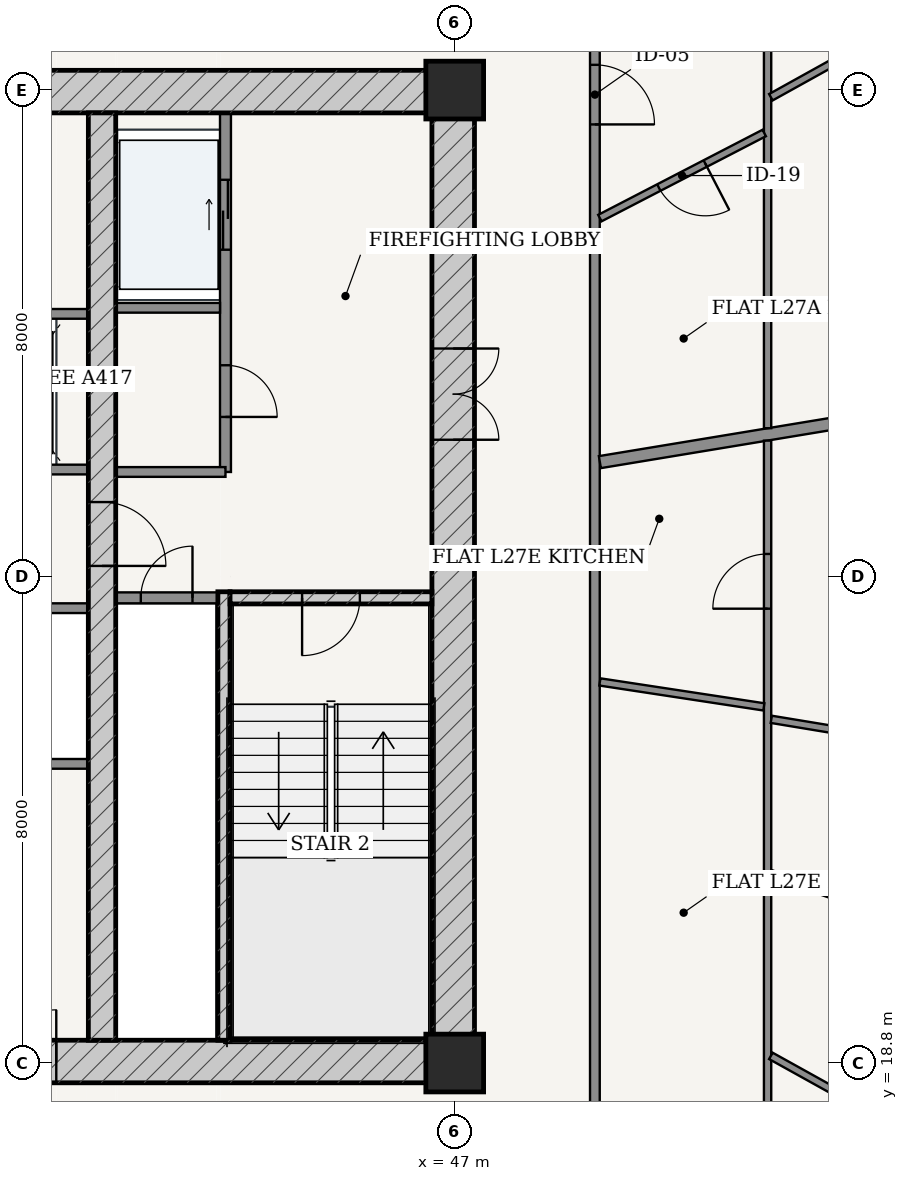
"""IFC4 building model, lengths in metres.
Left out: names, types, materials, properties, quantities, classifications, styles, units other than length and angle.
Written with IfcOpenShell. Run it as: python <this file> out.ifc"""

import sys

from ifc_helpers import new_model, si_unit, direction, frame, frame_2d, origin, origin_2d, place, context, subcontext, project, spatial, rectangle, extrude, source, transform, mapped, element, fill, save


model = new_model("IFC4")
c1 = context("Model", 3, precision=1e-05, world=origin(), true_north=direction((-0.2419218956, 0.970295726276)))
c2 = subcontext(c1, "Body", "Model", "MODEL_VIEW")
j1 = project(units=[si_unit("LENGTHUNIT", "METRE"), si_unit("PLANEANGLEUNIT", "RADIAN")], contexts=[c1])
p1 = place(None, origin())
s1 = spatial("IfcSite", under=j1, at=p1, CompositionType="ELEMENT")
p2 = place(p1, origin())
s2 = spatial("IfcBuilding", under=s1, at=p2, CompositionType="ELEMENT")
p3 = place(p2, frame((0.0, 0.0, 105.0)))
s3 = spatial("IfcBuildingStorey", under=s2, at=p3, CompositionType="ELEMENT", Elevation=105.0)
for number, where, z_axis, x_axis in (
    (1, (47.0, 18.8, 0.0), (0.0, 0.0, 1.0), (1.0, 0.0, 0.0)),
    (2, (47.0, 34.8, 0.0), (0.0, 0.0, 1.0), (1.0, 0.0, 0.0)),
):
    element("IfcColumn", number, at=place(p3, frame(where, z_axis=z_axis, x_axis=x_axis)), inside=s3, PredefinedType="COLUMN", context=c2, shape_type="SweptSolid", body=[
        extrude(rectangle(XDim=0.95, YDim=0.95, at=origin_2d()), origin(), (0.0, 0.0, 1.0), 3.6),
    ])
p4 = place(p3, frame((28.675, 18.825, 0.0), z_axis=(0.0, 0.0, 1.0), x_axis=(1.0, 0.0, 0.0)))
e3 = element("IfcWall", 3, at=p4, inside=s3, PredefinedType="SHEAR", context=c2, shape_type="SweptSolid", body=[
    extrude(rectangle(XDim=18.65, YDim=0.7, at=frame_2d((9.325, 0.0))), origin(), (0.0, 0.0, 1.0), 3.325),
])
p5 = place(p4, frame((6.877, 0.0, 0.0)))
e4 = element("IfcOpeningElement", 4, at=p5, cuts=e3, PredefinedType="OPENING", context=c2, shape_type="SweptSolid", body=[
    extrude(rectangle(XDim=0.85, YDim=2.1, at=frame_2d((0.425, 1.05))), frame((0.0, 0.36, 0.0), z_axis=(0.0, -1.0, 0.0), x_axis=(1.0, 0.0, 0.0)), (0.0, 0.0, 1.0), 0.72),
])
p6 = place(p4, frame((8.9, 0.0, 0.0)))
e5 = element("IfcOpeningElement", 5, at=p6, cuts=e3, PredefinedType="OPENING", context=c2, shape_type="SweptSolid", body=[
    extrude(rectangle(XDim=0.85, YDim=2.1, at=frame_2d((0.425, 1.05))), frame((0.0, 0.36, 0.0), z_axis=(0.0, -1.0, 0.0), x_axis=(1.0, 0.0, 0.0)), (0.0, 0.0, 1.0), 0.72),
])
p7 = place(p4, frame((10.923, 0.0, 0.0)))
e6 = element("IfcOpeningElement", 6, at=p7, cuts=e3, PredefinedType="OPENING", context=c2, shape_type="SweptSolid", body=[
    extrude(rectangle(XDim=0.85, YDim=2.1, at=frame_2d((0.425, 1.05))), frame((0.0, 0.36, 0.0), z_axis=(0.0, -1.0, 0.0), x_axis=(1.0, 0.0, 0.0)), (0.0, 0.0, 1.0), 0.72),
])
p8 = place(p3, frame((28.675, 34.775, 0.0), z_axis=(0.0, 0.0, 1.0), x_axis=(1.0, 0.0, 0.0)))
e7 = element("IfcWall", 7, at=p8, inside=s3, PredefinedType="SHEAR", context=c2, shape_type="SweptSolid", body=[
    extrude(rectangle(XDim=18.65, YDim=0.7, at=frame_2d((9.325, 0.0))), origin(), (0.0, 0.0, 1.0), 3.325),
])
p9 = place(p8, frame((7.357, 0.0, 0.0)))
e8 = element("IfcOpeningElement", 8, at=p9, cuts=e7, PredefinedType="OPENING", context=c2, shape_type="SweptSolid", body=[
    extrude(rectangle(XDim=0.86, YDim=2.1, at=frame_2d((0.43, 1.05))), frame((0.0, 0.36, 0.0), z_axis=(0.0, -1.0, 0.0), x_axis=(1.0, 0.0, 0.0)), (0.0, 0.0, 1.0), 0.72),
])
p10 = place(p8, frame((10.438, 0.0, 0.0)))
e9 = element("IfcOpeningElement", 9, at=p10, cuts=e7, PredefinedType="OPENING", context=c2, shape_type="SweptSolid", body=[
    extrude(rectangle(XDim=0.85, YDim=2.1, at=frame_2d((0.425, 1.05))), frame((0.0, 0.36, 0.0), z_axis=(0.0, -1.0, 0.0), x_axis=(1.0, 0.0, 0.0)), (0.0, 0.0, 1.0), 0.72),
])
p11 = place(p3, frame((46.975, 19.175, 0.0), z_axis=(0.0, 0.0, 1.0), x_axis=(0.0, 1.0, 0.0)))
e10 = element("IfcWall", 10, at=p11, inside=s3, PredefinedType="SHEAR", context=c2, shape_type="SweptSolid", body=[
    extrude(rectangle(XDim=15.25, YDim=0.7, at=frame_2d((7.625, 0.0))), origin(), (0.0, 0.0, 1.0), 3.325),
])
p12 = place(p11, frame((9.875, 0.0, 0.0)))
e11 = element("IfcOpeningElement", 11, at=p12, cuts=e10, PredefinedType="OPENING", context=c2, shape_type="SweptSolid", body=[
    extrude(rectangle(XDim=1.5, YDim=2.2, at=frame_2d((0.75, 1.1))), frame((0.0, 0.36, 0.0), z_axis=(0.0, -1.0, 0.0), x_axis=(1.0, 0.0, 0.0)), (0.0, 0.0, 1.0), 0.72),
])
p13 = place(p3, frame((43.205, 19.175, 0.0), z_axis=(0.0, 0.0, 1.0), x_axis=(0.0, 1.0, 0.0)))
e12 = element("IfcWall", 12, at=p13, inside=s3, PredefinedType="SOLIDWALL", context=c2, shape_type="SweptSolid", body=[
    extrude(rectangle(XDim=7.375, YDim=0.2, at=frame_2d((3.688, 0.0))), origin(), (0.0, 0.0, 1.0), 3.325),
])
p14 = place(p3, frame((43.305, 26.45, 0.0), z_axis=(0.0, 0.0, 1.0), x_axis=(1.0, 0.0, 0.0)))
e13 = element("IfcWall", 13, at=p14, inside=s3, PredefinedType="SOLIDWALL", context=c2, shape_type="SweptSolid", body=[
    extrude(rectangle(XDim=3.32, YDim=0.2, at=frame_2d((1.66, 0.0))), origin(), (0.0, 0.0, 1.0), 3.325),
])
p15 = place(p14, frame((1.185, 0.0, 0.0)))
e14 = element("IfcOpeningElement", 14, at=p15, cuts=e13, PredefinedType="OPENING", context=c2, shape_type="SweptSolid", body=[
    extrude(rectangle(XDim=0.95, YDim=2.15, at=frame_2d((0.475, 1.075))), frame((0.0, 0.11, 0.0), z_axis=(0.0, -1.0, 0.0), x_axis=(1.0, 0.0, 0.0)), (0.0, 0.0, 1.0), 0.22),
])
p16 = place(p3, frame((41.2, 19.175, 0.0), z_axis=(0.0, 0.0, 1.0), x_axis=(0.0, 1.0, 0.0)))
e15 = element("IfcWall", 15, at=p16, inside=s3, PredefinedType="SHEAR", context=c2, shape_type="SweptSolid", body=[
    extrude(rectangle(XDim=15.25, YDim=0.45, at=frame_2d((7.625, 0.0))), origin(), (0.0, 0.0, 1.0), 3.325),
])
p17 = place(p16, frame((7.8, 0.0, 0.0)))
e16 = element("IfcOpeningElement", 16, at=p17, cuts=e15, PredefinedType="OPENING", context=c2, shape_type="SweptSolid", body=[
    extrude(rectangle(XDim=1.05, YDim=2.15, at=frame_2d((0.525, 1.075))), frame((0.0, 0.235, 0.0), z_axis=(0.0, -1.0, 0.0), x_axis=(1.0, 0.0, 0.0)), (0.0, 0.0, 1.0), 0.47),
])
p18 = place(p3, frame((41.425, 26.45, 0.0), z_axis=(0.0, 0.0, 1.0), x_axis=(1.0, 0.0, 0.0)))
e17 = element("IfcWall", 17, at=p18, inside=s3, PredefinedType="PARTITIONING", context=c2, shape_type="SweptSolid", body=[
    extrude(rectangle(XDim=1.675, YDim=0.18, at=frame_2d((0.837, 0.0))), origin(), (0.0, 0.0, 1.0), 3.325),
])
p19 = place(p18, frame((0.413, 0.0, 0.0)))
e18 = element("IfcOpeningElement", 18, at=p19, cuts=e17, PredefinedType="OPENING", context=c2, shape_type="SweptSolid", body=[
    extrude(rectangle(XDim=0.85, YDim=2.1, at=frame_2d((0.425, 1.05))), frame((0.0, 0.1, 0.0), z_axis=(0.0, -1.0, 0.0), x_axis=(1.0, 0.0, 0.0)), (0.0, 0.0, 1.0), 0.2),
])
p20 = place(p3, frame((43.23, 28.52, 0.0), z_axis=(0.0, 0.0, 1.0), x_axis=(0.0, 1.0, 0.0)))
e19 = element("IfcWall", 19, at=p20, inside=s3, PredefinedType="PARTITIONING", context=c2, shape_type="SweptSolid", body=[
    extrude(rectangle(XDim=5.905, YDim=0.18, at=frame_2d((2.953, 0.0))), origin(), (0.0, 0.0, 1.0), 3.325),
])
p21 = place(p20, frame((0.905, 0.0, 0.0)))
e20 = element("IfcOpeningElement", 20, at=p21, cuts=e19, PredefinedType="OPENING", context=c2, shape_type="SweptSolid", body=[
    extrude(rectangle(XDim=0.85, YDim=2.1, at=frame_2d((0.425, 1.05))), frame((0.0, 0.1, 0.0), z_axis=(0.0, -1.0, 0.0), x_axis=(1.0, 0.0, 0.0)), (0.0, 0.0, 1.0), 0.2),
])
p22 = place(p20, frame((3.655, 0.0, 0.0)))
e21 = element("IfcOpeningElement", 21, at=p22, cuts=e19, PredefinedType="OPENING", context=c2, shape_type="SweptSolid", body=[
    extrude(rectangle(XDim=1.15, YDim=2.2, at=frame_2d((0.575, 1.1))), frame((0.0, 0.1, 0.0), z_axis=(0.0, -1.0, 0.0), x_axis=(1.0, 0.0, 0.0)), (0.0, 0.0, 1.0), 0.2),
])
p23 = place(p3, frame((41.425, 31.22, 0.0), z_axis=(0.0, 0.0, 1.0), x_axis=(1.0, 0.0, 0.0)))
e22 = element("IfcWall", 22, at=p23, inside=s3, PredefinedType="PARTITIONING", context=c2, shape_type="SweptSolid", body=[
    extrude(rectangle(XDim=1.715, YDim=0.16, at=frame_2d((0.857, 0.0))), origin(), (0.0, 0.0, 1.0), 3.325),
])
p24 = place(p3, frame((41.425, 28.52, 0.0), z_axis=(0.0, 0.0, 1.0), x_axis=(1.0, 0.0, 0.0)))
e23 = element("IfcWall", 23, at=p24, inside=s3, PredefinedType="PARTITIONING", context=c2, shape_type="SweptSolid", body=[
    extrude(rectangle(XDim=1.805, YDim=0.16, at=frame_2d((0.902, 0.0))), origin(), (0.0, 0.0, 1.0), 3.325),
])
p25 = place(p3, frame((35.025, 28.56, 0.0), z_axis=(0.0, 0.0, 1.0), x_axis=(1.0, 0.0, 0.0)))
e24 = element("IfcWall", 24, at=p25, inside=s3, PredefinedType="PARTITIONING", context=c2, shape_type="SweptSolid", body=[
    extrude(rectangle(XDim=5.95, YDim=0.16, at=frame_2d((2.975, 0.0))), origin(), (0.0, 0.0, 1.0), 3.325),
])
p26 = place(p25, frame((0.76, 0.0, 0.0)))
e25 = element("IfcOpeningElement", 25, at=p26, cuts=e24, PredefinedType="OPENING", context=c2, shape_type="SweptSolid", body=[
    extrude(rectangle(XDim=1.1, YDim=2.2, at=frame_2d((0.55, 1.1))), frame((0.0, 0.09, 0.0), z_axis=(0.0, -1.0, 0.0), x_axis=(1.0, 0.0, 0.0)), (0.0, 0.0, 1.0), 0.18),
])
p27 = place(p25, frame((2.425, 0.0, 0.0)))
e26 = element("IfcOpeningElement", 26, at=p27, cuts=e24, PredefinedType="OPENING", context=c2, shape_type="SweptSolid", body=[
    extrude(rectangle(XDim=1.1, YDim=2.2, at=frame_2d((0.55, 1.1))), frame((0.0, 0.09, 0.0), z_axis=(0.0, -1.0, 0.0), x_axis=(1.0, 0.0, 0.0)), (0.0, 0.0, 1.0), 0.18),
])
p28 = place(p25, frame((4.09, 0.0, 0.0)))
e27 = element("IfcOpeningElement", 27, at=p28, cuts=e24, PredefinedType="OPENING", context=c2, shape_type="SweptSolid", body=[
    extrude(rectangle(XDim=1.1, YDim=2.2, at=frame_2d((0.55, 1.1))), frame((0.0, 0.09, 0.0), z_axis=(0.0, -1.0, 0.0), x_axis=(1.0, 0.0, 0.0)), (0.0, 0.0, 1.0), 0.18),
])
for number, where, z_axis, x_axis in (
    (28, (35.025, 31.12, 0.0), (0.0, 0.0, 1.0), (1.0, 0.0, 0.0)),
    (29, (35.025, 26.28, 0.0), (0.0, 0.0, 1.0), (1.0, 0.0, 0.0)),
    (30, (35.025, 23.72, 0.0), (0.0, 0.0, 1.0), (1.0, 0.0, 0.0)),
):
    element("IfcWall", number, at=place(p3, frame(where, z_axis=z_axis, x_axis=x_axis)), inside=s3, PredefinedType="PARTITIONING", context=c2, shape_type="SweptSolid", body=[
        extrude(rectangle(XDim=5.95, YDim=0.16, at=frame_2d((2.975, 0.0))), origin(), (0.0, 0.0, 1.0), 3.325),
    ])
p29 = place(p3, frame((49.305, 16.575, 0.0), z_axis=(0.0, 0.0, 1.0), x_axis=(0.0, 1.0, 0.0)))
e31 = element("IfcWall", 31, at=p29, inside=s3, PredefinedType="PARTITIONING", context=c2, shape_type="SweptSolid", body=[
    extrude(rectangle(XDim=20.45, YDim=0.16, at=frame_2d((10.225, 0.0))), origin(), (0.0, 0.0, 1.0), 2.767),
])
p30 = place(p29, frame((17.66, 0.0, 0.0)))
e32 = element("IfcOpeningElement", 32, at=p30, cuts=e31, PredefinedType="OPENING", context=c2, shape_type="SweptSolid", body=[
    extrude(rectangle(XDim=0.98, YDim=2.2, at=frame_2d((0.49, 1.1))), frame((0.0, 0.09, 0.0), z_axis=(0.0, -1.0, 0.0), x_axis=(1.0, 0.0, 0.0)), (0.0, 0.0, 1.0), 0.18),
])
p31 = place(p3, frame((49.387, 28.682, 0.0), z_axis=(0.0, 0.0, 1.0), x_axis=(0.986617934215, 0.163049231479, 0.0)))
e33 = element("IfcWall", 33, at=p31, inside=s3, PredefinedType="PARTITIONING", context=c2, shape_type="SweptSolid", body=[
    extrude(rectangle(XDim=14.785, YDim=0.2, at=frame_2d((7.392, 0.0))), origin(), (0.0, 0.0, 1.0), 2.767),
])
p32 = place(p3, frame((52.145, 39.945, 0.0), z_axis=(0.0, 0.0, 1.0), x_axis=(0.0, -1.0, 0.0)))
e34 = element("IfcWall", 34, at=p32, inside=s3, PredefinedType="PARTITIONING", context=c2, shape_type="SweptSolid", body=[
    extrude(rectangle(XDim=10.705, YDim=0.12, at=frame_2d((5.353, 0.0))), origin(), (0.0, 0.0, 1.0), 2.767),
])
p33 = place(p32, frame((2.316, 0.0, 0.0)))
e35 = element("IfcOpeningElement", 35, at=p33, cuts=e34, PredefinedType="OPENING", context=c2, shape_type="SweptSolid", body=[
    extrude(rectangle(XDim=0.9, YDim=2.15, at=frame_2d((0.45, 1.075))), frame((0.0, 0.07, 0.0), z_axis=(0.0, -1.0, 0.0), x_axis=(1.0, 0.0, 0.0)), (0.0, 0.0, 1.0), 0.14),
])
p34 = place(p3, frame((52.199, 34.683, 0.0), z_axis=(0.0, 0.0, 1.0), x_axis=(0.874320827228, 0.485348422349, 0.0)))
e36 = element("IfcWall", 36, at=p34, inside=s3, PredefinedType="PARTITIONING", context=c2, shape_type="SweptSolid", body=[
    extrude(rectangle(XDim=8.94, YDim=0.12, at=frame_2d((4.47, 0.0))), origin(), (0.0, 0.0, 1.0), 2.767),
])
p35 = place(p34, frame((2.953, 0.0, 0.0)))
e37 = element("IfcOpeningElement", 37, at=p35, cuts=e36, PredefinedType="OPENING", context=c2, shape_type="SweptSolid", body=[
    extrude(rectangle(XDim=0.9, YDim=2.15, at=frame_2d((0.45, 1.075))), frame((0.0, 0.07, 0.0), z_axis=(0.0, -1.0, 0.0), x_axis=(1.0, 0.0, 0.0)), (0.0, 0.0, 1.0), 0.14),
])
p36 = place(p3, frame((49.387, 32.695, 0.0), z_axis=(0.0, 0.0, 1.0), x_axis=(0.888050549489, 0.459745822767, 0.0)))
e38 = element("IfcWall", 38, at=p36, inside=s3, PredefinedType="PARTITIONING", context=c2, shape_type="SweptSolid", body=[
    extrude(rectangle(XDim=3.044, YDim=0.12, at=frame_2d((1.522, 0.0))), origin(), (0.0, 0.0, 1.0), 3.325),
])
p37 = place(p36, frame((1.092, 0.0, 0.0)))
e39 = element("IfcOpeningElement", 39, at=p37, cuts=e38, PredefinedType="OPENING", context=c2, shape_type="SweptSolid", body=[
    extrude(rectangle(XDim=0.86, YDim=2.15, at=frame_2d((0.43, 1.075))), frame((0.0, 0.07, 0.0), z_axis=(0.0, -1.0, 0.0), x_axis=(1.0, 0.0, 0.0)), (0.0, 0.0, 1.0), 0.14),
])
p38 = place(p3, frame((52.145, 29.036, 0.0), z_axis=(0.0, 0.0, 1.0), x_axis=(0.0, -1.0, 0.0)))
e40 = element("IfcWall", 40, at=p38, inside=s3, PredefinedType="PARTITIONING", context=c2, shape_type="SweptSolid", body=[
    extrude(rectangle(XDim=15.381, YDim=0.12, at=frame_2d((7.69, 0.0))), origin(), (0.0, 0.0, 1.0), 2.767),
])
p39 = place(p38, frame((1.864, 0.0, 0.0)))
e41 = element("IfcOpeningElement", 41, at=p39, cuts=e40, PredefinedType="OPENING", context=c2, shape_type="SweptSolid", body=[
    extrude(rectangle(XDim=0.9, YDim=2.15, at=frame_2d((0.45, 1.075))), frame((0.0, 0.07, 0.0), z_axis=(0.0, -1.0, 0.0), x_axis=(1.0, 0.0, 0.0)), (0.0, 0.0, 1.0), 0.14),
])
p40 = place(p3, frame((52.199, 18.917, 0.0), z_axis=(0.0, 0.0, 1.0), x_axis=(0.874309238244, -0.485369298495, 0.0)))
e42 = element("IfcWall", 42, at=p40, inside=s3, PredefinedType="PARTITIONING", context=c2, shape_type="SweptSolid", body=[
    extrude(rectangle(XDim=8.94, YDim=0.12, at=frame_2d((4.47, 0.0))), origin(), (0.0, 0.0, 1.0), 2.767),
])
p41 = place(p40, frame((2.953, 0.0, 0.0)))
e43 = element("IfcOpeningElement", 43, at=p41, cuts=e42, PredefinedType="OPENING", context=c2, shape_type="SweptSolid", body=[
    extrude(rectangle(XDim=0.9, YDim=2.15, at=frame_2d((0.45, 1.075))), frame((0.0, 0.07, 0.0), z_axis=(0.0, -1.0, 0.0), x_axis=(1.0, 0.0, 0.0)), (0.0, 0.0, 1.0), 0.14),
])
p42 = place(p3, frame((52.204, 21.912, 0.0), z_axis=(0.0, 0.0, 1.0), x_axis=(0.945574063861, -0.325406960209, 0.0)))
e44 = element("IfcWall", 44, at=p42, inside=s3, PredefinedType="PARTITIONING", context=c2, shape_type="SweptSolid", body=[
    extrude(rectangle(XDim=10.906, YDim=0.12, at=frame_2d((5.453, 0.0))), origin(), (0.0, 0.0, 1.0), 2.767),
])
p43 = place(p42, frame((5.003, 0.0, 0.0)))
e45 = element("IfcOpeningElement", 45, at=p43, cuts=e44, PredefinedType="OPENING", context=c2, shape_type="SweptSolid", body=[
    extrude(rectangle(XDim=0.9, YDim=2.15, at=frame_2d((0.45, 1.075))), frame((0.0, 0.07, 0.0), z_axis=(0.0, -1.0, 0.0), x_axis=(1.0, 0.0, 0.0)), (0.0, 0.0, 1.0), 0.14),
])
p44 = place(p3, frame((52.206, 24.452, 0.0), z_axis=(0.0, 0.0, 1.0), x_axis=(0.986620350945, -0.163034607068, 0.0)))
e46 = element("IfcWall", 46, at=p44, inside=s3, PredefinedType="PARTITIONING", context=c2, shape_type="SweptSolid", body=[
    extrude(rectangle(XDim=11.927, YDim=0.12, at=frame_2d((5.964, 0.0))), origin(), (0.0, 0.0, 1.0), 2.767),
])
p45 = place(p44, frame((4.44, 0.0, 0.0)))
e47 = element("IfcOpeningElement", 47, at=p45, cuts=e46, PredefinedType="OPENING", context=c2, shape_type="SweptSolid", body=[
    extrude(rectangle(XDim=0.9, YDim=2.15, at=frame_2d((0.45, 1.075))), frame((0.0, 0.07, 0.0), z_axis=(0.0, -1.0, 0.0), x_axis=(1.0, 0.0, 0.0)), (0.0, 0.0, 1.0), 0.14),
])
p46 = place(p3, frame((49.387, 25.067, 0.0), z_axis=(0.0, 0.0, 1.0), x_axis=(0.988617679804, -0.150449603454, 0.0)))
e48 = element("IfcWall", 48, at=p46, inside=s3, PredefinedType="PARTITIONING", context=c2, shape_type="SweptSolid", body=[
    extrude(rectangle(XDim=2.728, YDim=0.12, at=frame_2d((1.364, 0.0))), origin(), (0.0, 0.0, 1.0), 2.767),
])
m1 = source(origin(), c2, "Body", "SweptSolid", [
    extrude(rectangle(XDim=1.5, YDim=2.2, at=frame_2d((0.75, 1.1))), frame((0.0, 0.025, 0.0), z_axis=(0.0, -1.0, 0.0), x_axis=(1.0, 0.0, 0.0)), (0.0, 0.0, 1.0), 0.05),
])
p47 = place(p12, frame((1.5, 0.0, 0.0), z_axis=(0.0, 0.0, 1.0), x_axis=(-1.0, 0.0, 0.0)))
e49 = element("IfcDoor", 49, at=p47, inside=s3, OperationType="DOUBLE_DOOR_SINGLE_SWING", PredefinedType="DOOR", context=c2, shape_type="MappedRepresentation", body=[
    mapped(m1, transform((0.0, 0.0, 0.0), scale=1.0)),
])
fill(e11, e49)
m2 = source(origin(), c2, "Body", "SweptSolid", [
    extrude(rectangle(XDim=1.05, YDim=2.15, at=frame_2d((0.525, 1.075))), frame((0.0, 0.025, 0.0), z_axis=(0.0, -1.0, 0.0), x_axis=(1.0, 0.0, 0.0)), (0.0, 0.0, 1.0), 0.05),
])
p48 = place(p17, frame((1.05, 0.0, 0.0), z_axis=(0.0, 0.0, 1.0), x_axis=(-1.0, 0.0, 0.0)))
e50 = element("IfcDoor", 50, at=p48, inside=s3, OperationType="SINGLE_SWING_RIGHT", PredefinedType="DOOR", context=c2, shape_type="MappedRepresentation", body=[
    mapped(m2, transform((0.0, 0.0, 0.0), scale=1.0)),
])
fill(e16, e50)
m3 = source(origin(), c2, "Body", "SweptSolid", [
    extrude(rectangle(XDim=0.95, YDim=2.15, at=frame_2d((0.475, 1.075))), frame((0.0, 0.025, 0.0), z_axis=(0.0, -1.0, 0.0), x_axis=(1.0, 0.0, 0.0)), (0.0, 0.0, 1.0), 0.05),
])
p49 = place(p15, frame((0.95, 0.0, 0.0), z_axis=(0.0, 0.0, 1.0), x_axis=(-1.0, 0.0, 0.0)))
e51 = element("IfcDoor", 51, at=p49, inside=s3, OperationType="SINGLE_SWING_RIGHT", PredefinedType="DOOR", context=c2, shape_type="MappedRepresentation", body=[
    mapped(m3, transform((0.0, 0.0, 0.0), scale=1.0)),
])
fill(e14, e51)
m4 = source(origin(), c2, "Body", "SweptSolid", [
    extrude(rectangle(XDim=0.85, YDim=2.1, at=frame_2d((0.425, 1.05))), frame((0.0, 0.025, 0.0), z_axis=(0.0, -1.0, 0.0), x_axis=(1.0, 0.0, 0.0)), (0.0, 0.0, 1.0), 0.05),
])
p50 = place(p19, origin())
e52 = element("IfcDoor", 52, at=p50, inside=s3, OperationType="SINGLE_SWING_RIGHT", PredefinedType="DOOR", context=c2, shape_type="MappedRepresentation", body=[
    mapped(m4, transform((0.0, 0.0, 0.0), scale=1.0)),
])
fill(e18, e52)
p51 = place(p21, frame((0.85, 0.0, 0.0), z_axis=(0.0, 0.0, 1.0), x_axis=(-1.0, 0.0, 0.0)))
e53 = element("IfcDoor", 53, at=p51, inside=s3, OperationType="SINGLE_SWING_RIGHT", PredefinedType="DOOR", context=c2, shape_type="MappedRepresentation", body=[
    mapped(m4, transform((0.0, 0.0, 0.0), scale=1.0)),
])
fill(e20, e53)
p52 = place(p7, origin())
e54 = element("IfcDoor", 54, at=p52, inside=s3, OperationType="SINGLE_SWING_RIGHT", PredefinedType="DOOR", context=c2, shape_type="MappedRepresentation", body=[
    mapped(m4, transform((0.0, 0.0, 0.0), scale=1.0)),
])
fill(e6, e54)
m5 = source(origin(), c2, "Body", "SweptSolid", [
    extrude(rectangle(XDim=1.15, YDim=2.2, at=frame_2d((0.575, 1.1))), frame((0.0, 0.025, 0.0), z_axis=(0.0, -1.0, 0.0), x_axis=(1.0, 0.0, 0.0)), (0.0, 0.0, 1.0), 0.05),
])
p53 = place(p22, origin())
e55 = element("IfcDoor", 55, at=p53, inside=s3, OperationType="DOUBLE_DOOR_SLIDING", PredefinedType="DOOR", context=c2, shape_type="MappedRepresentation", body=[
    mapped(m5, transform((0.0, 0.0, 0.0), scale=1.0)),
])
fill(e21, e55)
m6 = source(origin(), c2, "Body", "SweptSolid", [
    extrude(rectangle(XDim=0.98, YDim=2.2, at=frame_2d((0.49, 1.1))), frame((0.0, 0.025, 0.0), z_axis=(0.0, -1.0, 0.0), x_axis=(1.0, 0.0, 0.0)), (0.0, 0.0, 1.0), 0.05),
])
p54 = place(p30, frame((0.98, 0.0, 0.0), z_axis=(0.0, 0.0, 1.0), x_axis=(-1.0, 0.0, 0.0)))
e56 = element("IfcDoor", 56, at=p54, inside=s3, OperationType="SINGLE_SWING_RIGHT", PredefinedType="DOOR", context=c2, shape_type="MappedRepresentation", body=[
    mapped(m6, transform((0.0, 0.0, 0.0), scale=1.0)),
])
fill(e32, e56)
m7 = source(origin(), c2, "Body", "SweptSolid", [
    extrude(rectangle(XDim=0.86, YDim=2.15, at=frame_2d((0.43, 1.075))), frame((0.0, 0.025, 0.0), z_axis=(0.0, -1.0, 0.0), x_axis=(1.0, 0.0, 0.0)), (0.0, 0.0, 1.0), 0.05),
])
p55 = place(p37, frame((0.86, 0.0, 0.0), z_axis=(0.0, 0.0, 1.0), x_axis=(-1.0, 0.0, 0.0)))
e57 = element("IfcDoor", 57, at=p55, inside=s3, OperationType="SINGLE_SWING_LEFT", PredefinedType="DOOR", context=c2, shape_type="MappedRepresentation", body=[
    mapped(m7, transform((0.0, 0.0, 0.0), scale=1.0)),
])
fill(e39, e57)
m8 = source(origin(), c2, "Body", "SweptSolid", [
    extrude(rectangle(XDim=0.9, YDim=2.15, at=frame_2d((0.45, 1.075))), frame((0.0, 0.025, 0.0), z_axis=(0.0, -1.0, 0.0), x_axis=(1.0, 0.0, 0.0)), (0.0, 0.0, 1.0), 0.05),
])
p56 = place(p39, frame((0.9, 0.0, 0.0), z_axis=(0.0, 0.0, 1.0), x_axis=(-1.0, 0.0, 0.0)))
e58 = element("IfcDoor", 58, at=p56, inside=s3, OperationType="SINGLE_SWING_LEFT", PredefinedType="DOOR", context=c2, shape_type="MappedRepresentation", body=[
    mapped(m8, transform((0.0, 0.0, 0.0), scale=1.0)),
])
fill(e41, e58)
save(model, sys.argv[1])
